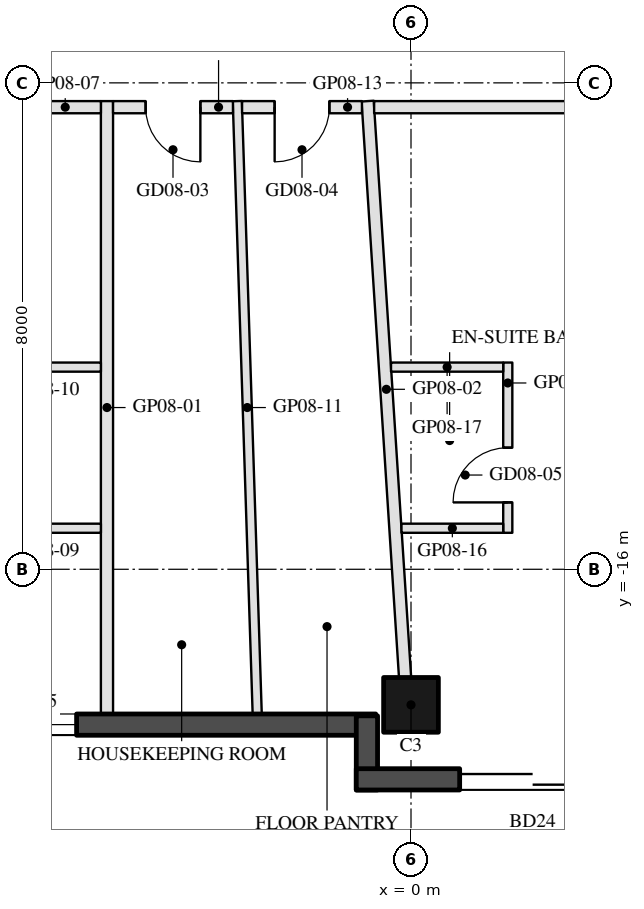
"""IFC4 building model, lengths in metres.
Left out: names, types, materials, properties, quantities, classifications, styles, units other than length and angle.
Written with IfcOpenShell. Run it as: python <this file> out.ifc"""

import sys

from ifc_helpers import new_model, si_unit, direction, frame, frame_2d, origin, origin_2d, place, context, subcontext, project, spatial, rectangle, hollow_rectangle, extrude, element, fill, save


model = new_model("IFC4")
c1 = context("Model", 3, precision=1e-05, world=origin(), true_north=direction((0.0, 1.0)))
c2 = subcontext(c1, "Body", "Model", "MODEL_VIEW")
j1 = project(units=[si_unit("LENGTHUNIT", "METRE"), si_unit("PLANEANGLEUNIT", "RADIAN")], contexts=[c1])
p1 = place(None, origin())
s1 = spatial("IfcSite", under=j1, at=p1, CompositionType="ELEMENT")
p2 = place(p1, origin())
s2 = spatial("IfcBuilding", under=s1, at=p2, CompositionType="ELEMENT")
p3 = place(p2, frame((0.0, 0.0, 102.0)))
s3 = spatial("IfcBuildingStorey", under=s2, at=p3, CompositionType="ELEMENT", Elevation=102.0)
p4 = place(p3, frame((0.0, -18.23, 0.0), z_axis=(0.0, 0.0, 1.0), x_axis=(-1.0, 0.0, 0.0)))
e1 = element("IfcColumn", 1, at=p4, inside=s3, PredefinedType="COLUMN", context=c2, shape_type="SweptSolid", body=[
    extrude(hollow_rectangle(XDim=0.9, YDim=0.9, WallThickness=0.04, at=origin_2d()), origin(), (0.0, 0.0, 1.0), 3.7),
])
p5 = place(p3, frame((-7.32, -18.555, 0.0), z_axis=(0.0, 0.0, 1.0), x_axis=(1.0, 0.0, 0.0)))
e2 = element("IfcWall", 2, at=p5, inside=s3, PredefinedType="SOLIDWALL", context=c2, shape_type="SweptSolid", body=[
    extrude(rectangle(XDim=6.74, YDim=0.35, at=frame_2d((3.37, 0.0))), origin(), (0.0, 0.0, 1.0), 3.55),
])
p6 = place(p5, frame((0.32, 0.0, 0.3)))
e3 = element("IfcOpeningElement", 3, at=p6, cuts=e2, PredefinedType="OPENING", context=c2, shape_type="SweptSolid", body=[
    extrude(rectangle(XDim=1.5, YDim=2.65, at=frame_2d((0.75, 1.325))), frame((0.0, 0.185, 0.0), z_axis=(0.0, -1.0, 0.0), x_axis=(1.0, 0.0, 0.0)), (0.0, 0.0, 1.0), 0.37),
])
p7 = place(p3, frame((-0.725, -18.41, 0.0), z_axis=(0.0, 0.0, 1.0), x_axis=(0.0, -1.0, 0.0)))
e4 = element("IfcWall", 4, at=p7, inside=s3, PredefinedType="SOLIDWALL", context=c2, shape_type="SweptSolid", body=[
    extrude(rectangle(XDim=1.22, YDim=0.35, at=frame_2d((0.61, 0.0))), origin(), (0.0, 0.0, 1.0), 3.55),
])
p8 = place(p3, frame((-0.9, -19.455, 0.0), z_axis=(0.0, 0.0, 1.0), x_axis=(1.0, 0.0, 0.0)))
e5 = element("IfcWall", 5, at=p8, inside=s3, PredefinedType="SOLIDWALL", context=c2, shape_type="SweptSolid", body=[
    extrude(rectangle(XDim=9.7, YDim=0.35, at=frame_2d((4.85, 0.0))), origin(), (0.0, 0.0, 1.0), 3.55),
])
p9 = place(p8, frame((1.7, 0.0, 0.0)))
e6 = element("IfcOpeningElement", 6, at=p9, cuts=e5, PredefinedType="OPENING", context=c2, shape_type="SweptSolid", body=[
    extrude(rectangle(XDim=2.4, YDim=2.4, at=frame_2d((1.2, 1.2))), frame((0.0, 0.185, 0.0), z_axis=(0.0, -1.0, 0.0), x_axis=(1.0, 0.0, 0.0)), (0.0, 0.0, 1.0), 0.37),
])
p10 = place(p8, frame((4.4, 0.0, 0.3)))
e7 = element("IfcOpeningElement", 7, at=p10, cuts=e5, PredefinedType="OPENING", context=c2, shape_type="SweptSolid", body=[
    extrude(rectangle(XDim=1.6, YDim=2.65, at=frame_2d((0.8, 1.325))), frame((0.0, 0.185, 0.0), z_axis=(0.0, -1.0, 0.0), x_axis=(1.0, 0.0, 0.0)), (0.0, 0.0, 1.0), 0.37),
])
p11 = place(p8, frame((6.3, 0.0, 0.3)))
e8 = element("IfcOpeningElement", 8, at=p11, cuts=e5, PredefinedType="OPENING", context=c2, shape_type="SweptSolid", body=[
    extrude(rectangle(XDim=1.6, YDim=2.65, at=frame_2d((0.8, 1.325))), frame((0.0, 0.185, 0.0), z_axis=(0.0, -1.0, 0.0), x_axis=(1.0, 0.0, 0.0)), (0.0, 0.0, 1.0), 0.37),
])
p12 = place(p3, frame((-5.0, -18.38, 0.0), z_axis=(0.0, 0.0, 1.0), x_axis=(0.0, 1.0, 0.0)))
e9 = element("IfcWall", 9, at=p12, inside=s3, PredefinedType="PARTITIONING", context=c2, shape_type="SweptSolid", body=[
    extrude(rectangle(XDim=10.08, YDim=0.2, at=frame_2d((5.04, 0.0))), origin(), (0.0, 0.0, 1.0), 2.96),
])
p13 = place(p3, frame((-0.097, -17.78, 0.0), z_axis=(0.0, 0.0, 1.0), x_axis=(-0.064787627283, 0.997899074732, 0.0)))
e10 = element("IfcWall", 10, at=p13, inside=s3, PredefinedType="PARTITIONING", context=c2, shape_type="SweptSolid", body=[
    extrude(rectangle(XDim=9.5, YDim=0.2, at=frame_2d((4.75, 0.0))), origin(), (0.0, 0.0, 1.0), 2.95),
])
p14 = place(p3, frame((-5.1, -8.4, 0.0), z_axis=(0.0, 0.0, 1.0), x_axis=(-1.0, 0.0, 0.0)))
e11 = element("IfcWall", 11, at=p14, inside=s3, PredefinedType="PARTITIONING", context=c2, shape_type="SweptSolid", body=[
    extrude(rectangle(XDim=4.888, YDim=0.2, at=frame_2d((2.444, 0.0))), origin(), (0.0, 0.0, 1.0), 2.95),
])
p15 = place(p14, frame((1.944, 0.0, 0.0)))
e12 = element("IfcOpeningElement", 12, at=p15, cuts=e11, PredefinedType="OPENING", context=c2, shape_type="SweptSolid", body=[
    extrude(rectangle(XDim=1.0, YDim=2.1, at=frame_2d((0.5, 1.05))), frame((0.0, 0.11, 0.0), z_axis=(0.0, -1.0, 0.0), x_axis=(1.0, 0.0, 0.0)), (0.0, 0.0, 1.0), 0.22),
])
for number, where, z_axis, x_axis in (
    (13, (-6.95, -15.325, 0.0), (0.0, 0.0, 1.0), (1.0, 0.0, 0.0)),
    (14, (-6.95, -12.675, 0.0), (0.0, 0.0, 1.0), (1.0, 0.0, 0.0)),
):
    element("IfcWall", number, at=place(p3, frame(where, z_axis=z_axis, x_axis=x_axis)), inside=s3, PredefinedType="PARTITIONING", context=c2, shape_type="SweptSolid", body=[
        extrude(rectangle(XDim=1.85, YDim=0.15, at=frame_2d((0.925, 0.0))), origin(), (0.0, 0.0, 1.0), 3.55),
    ])
p16 = place(p3, frame((-2.529, -18.38, 0.0), z_axis=(0.0, 0.0, 1.0), x_axis=(-0.032438656137, 0.999473728313, 0.0)))
e15 = element("IfcWall", 15, at=p16, inside=s3, PredefinedType="PARTITIONING", context=c2, shape_type="SweptSolid", body=[
    extrude(rectangle(XDim=10.085, YDim=0.15, at=frame_2d((5.042, 0.0))), origin(), (0.0, 0.0, 1.0), 2.96),
])
p17 = place(p3, frame((-2.928, -8.4, 0.0), z_axis=(0.0, 0.0, 1.0), x_axis=(-1.0, 0.0, 0.0)))
e16 = element("IfcWall", 16, at=p17, inside=s3, PredefinedType="PARTITIONING", context=c2, shape_type="SweptSolid", body=[
    extrude(rectangle(XDim=1.972, YDim=0.2, at=frame_2d((0.986, 0.0))), origin(), (0.0, 0.0, 1.0), 2.95),
])
p18 = place(p17, frame((0.536, 0.0, 0.0)))
e17 = element("IfcOpeningElement", 17, at=p18, cuts=e16, PredefinedType="OPENING", context=c2, shape_type="SweptSolid", body=[
    extrude(rectangle(XDim=0.9, YDim=2.1, at=frame_2d((0.45, 1.05))), frame((0.0, 0.11, 0.0), z_axis=(0.0, -1.0, 0.0), x_axis=(1.0, 0.0, 0.0)), (0.0, 0.0, 1.0), 0.22),
])
p19 = place(p3, frame((-0.807, -8.4, 0.0), z_axis=(0.0, 0.0, 1.0), x_axis=(-1.0, 0.0, 0.0)))
e18 = element("IfcWall", 18, at=p19, inside=s3, PredefinedType="PARTITIONING", context=c2, shape_type="SweptSolid", body=[
    extrude(rectangle(XDim=1.972, YDim=0.2, at=frame_2d((0.986, 0.0))), origin(), (0.0, 0.0, 1.0), 3.55),
])
p20 = place(p19, frame((0.536, 0.0, 0.0)))
e19 = element("IfcOpeningElement", 19, at=p20, cuts=e18, PredefinedType="OPENING", context=c2, shape_type="SweptSolid", body=[
    extrude(rectangle(XDim=0.9, YDim=2.1, at=frame_2d((0.45, 1.05))), frame((0.0, 0.11, 0.0), z_axis=(0.0, -1.0, 0.0), x_axis=(1.0, 0.0, 0.0)), (0.0, 0.0, 1.0), 0.22),
])
p21 = place(p3, frame((9.988, -8.4, 0.0), z_axis=(0.0, 0.0, 1.0), x_axis=(-1.0, 0.0, 0.0)))
e20 = element("IfcWall", 20, at=p21, inside=s3, PredefinedType="PARTITIONING", context=c2, shape_type="SweptSolid", body=[
    extrude(rectangle(XDim=10.594, YDim=0.2, at=frame_2d((5.297, 0.0))), origin(), (0.0, 0.0, 1.0), 2.95),
])
p22 = place(p21, frame((4.797, 0.0, 0.0)))
e21 = element("IfcOpeningElement", 21, at=p22, cuts=e20, PredefinedType="OPENING", context=c2, shape_type="SweptSolid", body=[
    extrude(rectangle(XDim=1.0, YDim=2.1, at=frame_2d((0.5, 1.05))), frame((0.0, 0.11, 0.0), z_axis=(0.0, -1.0, 0.0), x_axis=(1.0, 0.0, 0.0)), (0.0, 0.0, 1.0), 0.22),
])
p23 = place(p3, frame((1.591, -15.4, 0.0), z_axis=(0.0, 0.0, 1.0), x_axis=(0.0, 1.0, 0.0)))
e22 = element("IfcWall", 22, at=p23, inside=s3, PredefinedType="PARTITIONING", context=c2, shape_type="SweptSolid", body=[
    extrude(rectangle(XDim=2.8, YDim=0.15, at=frame_2d((1.4, 0.0))), origin(), (0.0, 0.0, 1.0), 3.55),
])
p24 = place(p23, frame((0.5, 0.0, 0.0)))
e23 = element("IfcOpeningElement", 23, at=p24, cuts=e22, PredefinedType="OPENING", context=c2, shape_type="SweptSolid", body=[
    extrude(rectangle(XDim=0.9, YDim=2.1, at=frame_2d((0.45, 1.05))), frame((0.0, 0.085, 0.0), z_axis=(0.0, -1.0, 0.0), x_axis=(1.0, 0.0, 0.0)), (0.0, 0.0, 1.0), 0.17),
])
p25 = place(p3, frame((-0.156, -15.325, 0.0), z_axis=(0.0, 0.0, 1.0), x_axis=(1.0, 0.0, 0.0)))
e24 = element("IfcWall", 24, at=p25, inside=s3, PredefinedType="PARTITIONING", context=c2, shape_type="SweptSolid", body=[
    extrude(rectangle(XDim=1.673, YDim=0.15, at=frame_2d((0.836, 0.0))), origin(), (0.0, 0.0, 1.0), 2.95),
])
p26 = place(p3, frame((-0.329, -12.675, 0.0), z_axis=(0.0, 0.0, 1.0), x_axis=(1.0, 0.0, 0.0)))
e25 = element("IfcWall", 25, at=p26, inside=s3, PredefinedType="PARTITIONING", context=c2, shape_type="SweptSolid", body=[
    extrude(rectangle(XDim=1.845, YDim=0.15, at=frame_2d((0.922, 0.0))), origin(), (0.0, 0.0, 1.0), 2.95),
])
p27 = place(p6, origin())
e26 = element("IfcWindow", 26, at=p27, inside=s3, PartitioningType="SINGLE_PANEL", PredefinedType="WINDOW", context=c2, shape_type="SweptSolid", body=[
    extrude(rectangle(XDim=1.5, YDim=2.65, at=frame_2d((0.75, 1.325))), frame((0.0, 0.03, 0.0), z_axis=(0.0, -1.0, 0.0), x_axis=(1.0, 0.0, 0.0)), (0.0, 0.0, 1.0), 0.06),
])
fill(e3, e26)
p28 = place(p9, frame((2.4, 0.0, 0.0), z_axis=(0.0, 0.0, 1.0), x_axis=(-1.0, 0.0, 0.0)))
e27 = element("IfcDoor", 27, at=p28, inside=s3, OperationType="SLIDING_TO_LEFT", PredefinedType="DOOR", context=c2, shape_type="SweptSolid", body=[
    extrude(rectangle(XDim=2.4, YDim=2.4, at=frame_2d((1.2, 1.2))), frame((0.0, 0.025, 0.0), z_axis=(0.0, -1.0, 0.0), x_axis=(1.0, 0.0, 0.0)), (0.0, 0.0, 1.0), 0.05),
])
fill(e6, e27)
p29 = place(p18, origin())
e28 = element("IfcDoor", 28, at=p29, inside=s3, OperationType="SINGLE_SWING_LEFT", PredefinedType="DOOR", context=c2, shape_type="SweptSolid", body=[
    extrude(rectangle(XDim=0.9, YDim=2.1, at=frame_2d((0.45, 1.05))), frame((0.0, 0.025, 0.0), z_axis=(0.0, -1.0, 0.0), x_axis=(1.0, 0.0, 0.0)), (0.0, 0.0, 1.0), 0.05),
])
fill(e17, e28)
p30 = place(p20, origin())
e29 = element("IfcDoor", 29, at=p30, inside=s3, OperationType="SINGLE_SWING_RIGHT", PredefinedType="DOOR", context=c2, shape_type="SweptSolid", body=[
    extrude(rectangle(XDim=0.9, YDim=2.1, at=frame_2d((0.45, 1.05))), frame((0.0, 0.025, 0.0), z_axis=(0.0, -1.0, 0.0), x_axis=(1.0, 0.0, 0.0)), (0.0, 0.0, 1.0), 0.05),
])
fill(e19, e29)
p31 = place(p24, origin())
e30 = element("IfcDoor", 30, at=p31, inside=s3, OperationType="SINGLE_SWING_LEFT", PredefinedType="DOOR", context=c2, shape_type="SweptSolid", body=[
    extrude(rectangle(XDim=0.9, YDim=2.1, at=frame_2d((0.45, 1.05))), frame((0.0, 0.025, 0.0), z_axis=(0.0, -1.0, 0.0), x_axis=(1.0, 0.0, 0.0)), (0.0, 0.0, 1.0), 0.05),
])
fill(e23, e30)
save(model, sys.argv[1])
